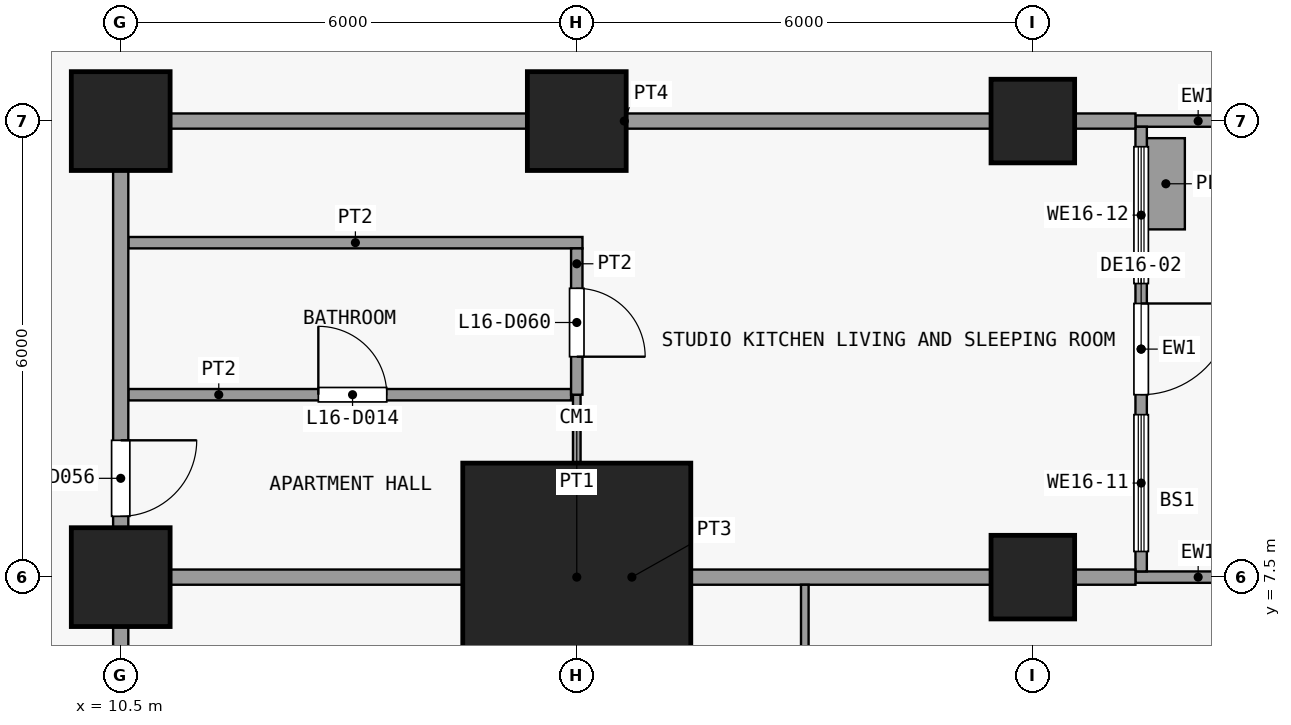
"""IFC4 building model, lengths in metres.
Left out: names, types, materials, properties, quantities, classifications, styles, units other than length and angle.
Written with IfcOpenShell. Run it as: python <this file> out.ifc"""

import sys

from ifc_helpers import new_model, si_unit, direction, frame, frame_2d, origin, origin_2d, place, context, subcontext, project, spatial, rectangle, extrude, element, fill, save


model = new_model("IFC4")
c1 = context("Model", 3, precision=1e-05, world=origin(), true_north=direction((0.0, 1.0)))
c2 = subcontext(c1, "Body", "Model", "MODEL_VIEW")
j1 = project(units=[si_unit("LENGTHUNIT", "METRE"), si_unit("PLANEANGLEUNIT", "RADIAN")], contexts=[c1])
p1 = place(None, origin())
s1 = spatial("IfcSite", under=j1, at=p1, CompositionType="ELEMENT")
p2 = place(p1, origin())
s2 = spatial("IfcBuilding", under=s1, at=p2, CompositionType="ELEMENT")
p3 = place(p2, frame((0.0, 0.0, 68.5)))
s3 = spatial("IfcBuildingStorey", under=s2, at=p3, CompositionType="ELEMENT", Elevation=68.5)
for number, where, z_axis, x_axis in (
    (1, (10.5, 7.5, 0.0), (0.0, 0.0, 1.0), (1.0, 0.0, 0.0)),
    (2, (10.5, 13.5, 0.0), (0.0, 0.0, 1.0), (1.0, 0.0, 0.0)),
):
    element("IfcColumn", number, at=place(p3, frame(where, z_axis=z_axis, x_axis=x_axis)), inside=s3, PredefinedType="COLUMN", context=c2, shape_type="SweptSolid", body=[
        extrude(rectangle(XDim=1.3, YDim=1.3, at=origin_2d()), origin(), (0.0, 0.0, 1.0), 3.6),
    ])
p4 = place(p3, frame((16.5, 7.5, 0.0), z_axis=(0.0, 0.0, 1.0), x_axis=(1.0, 0.0, 0.0)))
e3 = element("IfcColumn", 3, at=p4, inside=s3, PredefinedType="COLUMN", context=c2, shape_type="SweptSolid", body=[
    extrude(rectangle(XDim=3.0, YDim=3.0, at=origin_2d()), origin(), (0.0, 0.0, 1.0), 3.6),
])
p5 = place(p3, frame((16.5, 13.5, 0.0), z_axis=(0.0, 0.0, 1.0), x_axis=(1.0, 0.0, 0.0)))
e4 = element("IfcColumn", 4, at=p5, inside=s3, PredefinedType="COLUMN", context=c2, shape_type="SweptSolid", body=[
    extrude(rectangle(XDim=1.3, YDim=1.3, at=origin_2d()), origin(), (0.0, 0.0, 1.0), 3.6),
])
for number, where, z_axis, x_axis in (
    (5, (22.5, 7.5, 0.0), (0.0, 0.0, 1.0), (1.0, 0.0, 0.0)),
    (6, (22.5, 13.5, 0.0), (0.0, 0.0, 1.0), (1.0, 0.0, 0.0)),
):
    element("IfcColumn", number, at=place(p3, frame(where, z_axis=z_axis, x_axis=x_axis)), inside=s3, PredefinedType="COLUMN", context=c2, shape_type="SweptSolid", body=[
        extrude(rectangle(XDim=1.1, YDim=1.1, at=origin_2d()), origin(), (0.0, 0.0, 1.0), 3.6),
    ])
for number, where, z_axis, x_axis in (
    (7, (23.85, 7.5, 0.0), (0.0, 0.0, 1.0), (1.0, 0.0, 0.0)),
    (8, (23.85, 13.5, 0.0), (0.0, 0.0, 1.0), (1.0, 0.0, 0.0)),
):
    element("IfcWall", number, at=place(p3, frame(where, z_axis=z_axis, x_axis=x_axis)), inside=s3, PredefinedType="SOLIDWALL", context=c2, shape_type="SweptSolid", body=[
        extrude(rectangle(XDim=1.65, YDim=0.15, at=frame_2d((0.825, 0.0))), origin(), (0.0, 0.0, 1.0), 3.3),
    ])
p6 = place(p3, frame((23.925, 13.425, 0.0), z_axis=(0.0, 0.0, 1.0), x_axis=(0.0, -1.0, 0.0)))
e9 = element("IfcWall", 9, at=p6, inside=s3, PredefinedType="SOLIDWALL", context=c2, shape_type="SweptSolid", body=[
    extrude(rectangle(XDim=5.85, YDim=0.15, at=frame_2d((2.925, 0.0))), origin(), (0.0, 0.0, 1.0), 3.3),
])
p7 = place(p6, frame((2.325, 0.0, 0.0)))
e10 = element("IfcOpeningElement", 10, at=p7, cuts=e9, PredefinedType="OPENING", context=c2, shape_type="SweptSolid", body=[
    extrude(rectangle(XDim=1.2, YDim=2.4, at=frame_2d((0.6, 1.2))), frame((0.0, 0.085, 0.0), z_axis=(0.0, -1.0, 0.0), x_axis=(1.0, 0.0, 0.0)), (0.0, 0.0, 1.0), 0.17),
])
p8 = place(p6, frame((3.788, 0.0, 0.9)))
e11 = element("IfcOpeningElement", 11, at=p8, cuts=e9, PredefinedType="OPENING", context=c2, shape_type="SweptSolid", body=[
    extrude(rectangle(XDim=1.8, YDim=2.1, at=frame_2d((0.9, 1.05))), frame((0.0, 0.085, 0.0), z_axis=(0.0, -1.0, 0.0), x_axis=(1.0, 0.0, 0.0)), (0.0, 0.0, 1.0), 0.17),
])
p9 = place(p6, frame((0.262, 0.0, 0.9)))
e12 = element("IfcOpeningElement", 12, at=p9, cuts=e9, PredefinedType="OPENING", context=c2, shape_type="SweptSolid", body=[
    extrude(rectangle(XDim=1.8, YDim=2.1, at=frame_2d((0.9, 1.05))), frame((0.0, 0.085, 0.0), z_axis=(0.0, -1.0, 0.0), x_axis=(1.0, 0.0, 0.0)), (0.0, 0.0, 1.0), 0.17),
])
p10 = place(p3, frame((24.25, 12.075, 0.0), z_axis=(0.0, 0.0, 1.0), x_axis=(0.0, 1.0, 0.0)))
e13 = element("IfcWall", 13, at=p10, inside=s3, PredefinedType="USERDEFINED", context=c2, shape_type="SweptSolid", body=[
    extrude(rectangle(XDim=1.2, YDim=0.5, at=frame_2d((0.6, 0.0))), origin(), (0.0, 0.0, 1.0), 0.9),
])
p11 = place(p3, frame((10.6, 7.5, 0.0), z_axis=(0.0, 0.0, 1.0), x_axis=(1.0, 0.0, 0.0)))
e14 = element("IfcWall", 14, at=p11, inside=s3, PredefinedType="PARTITIONING", context=c2, shape_type="SweptSolid", body=[
    extrude(rectangle(XDim=13.25, YDim=0.2, at=frame_2d((6.625, 0.0))), origin(), (0.0, 0.0, 1.0), 3.3),
])
p12 = place(p3, frame((10.6, 9.9, 0.0), z_axis=(0.0, 0.0, 1.0), x_axis=(1.0, 0.0, 0.0)))
e15 = element("IfcWall", 15, at=p12, inside=s3, PredefinedType="PARTITIONING", context=c2, shape_type="SweptSolid", body=[
    extrude(rectangle(XDim=5.825, YDim=0.15, at=frame_2d((2.913, 0.0))), origin(), (0.0, 0.0, 1.0), 3.3),
])
p13 = place(p12, frame((2.5, 0.0, 0.0)))
e16 = element("IfcOpeningElement", 16, at=p13, cuts=e15, PredefinedType="OPENING", context=c2, shape_type="SweptSolid", body=[
    extrude(rectangle(XDim=0.9, YDim=2.1, at=frame_2d((0.45, 1.05))), frame((0.0, 0.085, 0.0), z_axis=(0.0, -1.0, 0.0), x_axis=(1.0, 0.0, 0.0)), (0.0, 0.0, 1.0), 0.17),
])
p14 = place(p3, frame((10.6, 11.9, 0.0), z_axis=(0.0, 0.0, 1.0), x_axis=(1.0, 0.0, 0.0)))
e17 = element("IfcWall", 17, at=p14, inside=s3, PredefinedType="PARTITIONING", context=c2, shape_type="SweptSolid", body=[
    extrude(rectangle(XDim=5.975, YDim=0.15, at=frame_2d((2.987, 0.0))), origin(), (0.0, 0.0, 1.0), 3.3),
])
p15 = place(p3, frame((10.4, 13.5, 0.0), z_axis=(0.0, 0.0, 1.0), x_axis=(1.0, 0.0, 0.0)))
e18 = element("IfcWall", 18, at=p15, inside=s3, PredefinedType="PARTITIONING", context=c2, shape_type="SweptSolid", body=[
    extrude(rectangle(XDim=13.45, YDim=0.2, at=frame_2d((6.725, 0.0))), origin(), (0.0, 0.0, 1.0), 3.3),
])
p16 = place(p3, frame((10.5, -4.4, 0.0), z_axis=(0.0, 0.0, 1.0), x_axis=(0.0, 1.0, 0.0)))
e19 = element("IfcWall", 19, at=p16, inside=s3, PredefinedType="PARTITIONING", context=c2, shape_type="SweptSolid", body=[
    extrude(rectangle(XDim=17.8, YDim=0.2, at=frame_2d((8.9, 0.0))), origin(), (0.0, 0.0, 1.0), 3.3),
])
p17 = place(p16, frame((3.1, 0.0, 0.0)))
e20 = element("IfcOpeningElement", 20, at=p17, cuts=e19, PredefinedType="OPENING", context=c2, shape_type="SweptSolid", body=[
    extrude(rectangle(XDim=1.0, YDim=2.1, at=frame_2d((0.5, 1.05))), frame((0.0, 0.11, 0.0), z_axis=(0.0, -1.0, 0.0), x_axis=(1.0, 0.0, 0.0)), (0.0, 0.0, 1.0), 0.22),
])
p18 = place(p16, frame((12.7, 0.0, 0.0)))
e21 = element("IfcOpeningElement", 21, at=p18, cuts=e19, PredefinedType="OPENING", context=c2, shape_type="SweptSolid", body=[
    extrude(rectangle(XDim=1.0, YDim=2.1, at=frame_2d((0.5, 1.05))), frame((0.0, 0.11, 0.0), z_axis=(0.0, -1.0, 0.0), x_axis=(1.0, 0.0, 0.0)), (0.0, 0.0, 1.0), 0.22),
])
p19 = place(p3, frame((16.5, 4.4, 0.0), z_axis=(0.0, 0.0, 1.0), x_axis=(0.0, 1.0, 0.0)))
e22 = element("IfcWall", 22, at=p19, inside=s3, PredefinedType="PARTITIONING", context=c2, shape_type="SweptSolid", body=[
    extrude(rectangle(XDim=3.0, YDim=0.1, at=frame_2d((1.5, 0.0))), origin(), (0.0, 0.0, 1.0), 3.3),
])
p20 = place(p3, frame((16.5, 7.6, 0.0), z_axis=(0.0, 0.0, 1.0), x_axis=(0.0, 1.0, 0.0)))
e23 = element("IfcWall", 23, at=p20, inside=s3, PredefinedType="PARTITIONING", context=c2, shape_type="SweptSolid", body=[
    extrude(rectangle(XDim=2.3, YDim=0.1, at=frame_2d((1.15, 0.0))), origin(), (0.0, 0.0, 1.0), 3.3),
])
p21 = place(p3, frame((16.5, 9.9, 0.0), z_axis=(0.0, 0.0, 1.0), x_axis=(0.0, 1.0, 0.0)))
e24 = element("IfcWall", 24, at=p21, inside=s3, PredefinedType="PARTITIONING", context=c2, shape_type="SweptSolid", body=[
    extrude(rectangle(XDim=1.925, YDim=0.15, at=frame_2d((0.962, 0.0))), origin(), (0.0, 0.0, 1.0), 3.3),
])
p22 = place(p21, frame((0.5, 0.0, 0.0)))
e25 = element("IfcOpeningElement", 25, at=p22, cuts=e24, PredefinedType="OPENING", context=c2, shape_type="SweptSolid", body=[
    extrude(rectangle(XDim=0.9, YDim=2.1, at=frame_2d((0.45, 1.05))), frame((0.0, 0.085, 0.0), z_axis=(0.0, -1.0, 0.0), x_axis=(1.0, 0.0, 0.0)), (0.0, 0.0, 1.0), 0.17),
])
p23 = place(p3, frame((19.5, 1.55, 0.0), z_axis=(0.0, 0.0, 1.0), x_axis=(0.0, 1.0, 0.0)))
e26 = element("IfcWall", 26, at=p23, inside=s3, PredefinedType="PARTITIONING", context=c2, shape_type="SweptSolid", body=[
    extrude(rectangle(XDim=5.85, YDim=0.1, at=frame_2d((2.925, 0.0))), origin(), (0.0, 0.0, 1.0), 3.3),
])
p24 = place(p23, frame((2.5, 0.0, 0.0)))
e27 = element("IfcOpeningElement", 27, at=p24, cuts=e26, PredefinedType="OPENING", context=c2, shape_type="SweptSolid", body=[
    extrude(rectangle(XDim=0.9, YDim=2.1, at=frame_2d((0.45, 1.05))), frame((0.0, 0.06, 0.0), z_axis=(0.0, -1.0, 0.0), x_axis=(1.0, 0.0, 0.0)), (0.0, 0.0, 1.0), 0.12),
])
p25 = place(p7, origin())
e28 = element("IfcDoor", 28, at=p25, inside=s3, OperationType="SINGLE_SWING_LEFT", PredefinedType="DOOR", context=c2, shape_type="SweptSolid", body=[
    extrude(rectangle(XDim=1.2, YDim=2.4, at=frame_2d((0.6, 1.2))), frame((0.0, 0.025, 0.0), z_axis=(0.0, -1.0, 0.0), x_axis=(1.0, 0.0, 0.0)), (0.0, 0.0, 1.0), 0.05),
])
fill(e10, e28)
p26 = place(p8, origin())
e29 = element("IfcWindow", 29, at=p26, inside=s3, PartitioningType="SINGLE_PANEL", PredefinedType="WINDOW", context=c2, shape_type="SweptSolid", body=[
    extrude(rectangle(XDim=1.8, YDim=2.1, at=frame_2d((0.9, 1.05))), frame((0.0, 0.03, 0.0), z_axis=(0.0, -1.0, 0.0), x_axis=(1.0, 0.0, 0.0)), (0.0, 0.0, 1.0), 0.06),
])
fill(e11, e29)
p27 = place(p9, origin())
e30 = element("IfcWindow", 30, at=p27, inside=s3, PartitioningType="SINGLE_PANEL", PredefinedType="WINDOW", context=c2, shape_type="SweptSolid", body=[
    extrude(rectangle(XDim=1.8, YDim=2.1, at=frame_2d((0.9, 1.05))), frame((0.0, 0.03, 0.0), z_axis=(0.0, -1.0, 0.0), x_axis=(1.0, 0.0, 0.0)), (0.0, 0.0, 1.0), 0.06),
])
fill(e12, e30)
p28 = place(p13, origin())
e31 = element("IfcDoor", 31, at=p28, inside=s3, OperationType="SINGLE_SWING_RIGHT", PredefinedType="DOOR", context=c2, shape_type="SweptSolid", body=[
    extrude(rectangle(XDim=0.9, YDim=2.1, at=frame_2d((0.45, 1.05))), frame((0.0, 0.025, 0.0), z_axis=(0.0, -1.0, 0.0), x_axis=(1.0, 0.0, 0.0)), (0.0, 0.0, 1.0), 0.05),
])
fill(e16, e31)
p29 = place(p18, origin())
e32 = element("IfcDoor", 32, at=p29, inside=s3, OperationType="SINGLE_SWING_RIGHT", PredefinedType="DOOR", context=c2, shape_type="SweptSolid", body=[
    extrude(rectangle(XDim=1.0, YDim=2.1, at=frame_2d((0.5, 1.05))), frame((0.0, 0.025, 0.0), z_axis=(0.0, -1.0, 0.0), x_axis=(1.0, 0.0, 0.0)), (0.0, 0.0, 1.0), 0.05),
])
fill(e21, e32)
p30 = place(p22, origin())
e33 = element("IfcDoor", 33, at=p30, inside=s3, OperationType="SINGLE_SWING_LEFT", PredefinedType="DOOR", context=c2, shape_type="SweptSolid", body=[
    extrude(rectangle(XDim=0.9, YDim=2.1, at=frame_2d((0.45, 1.05))), frame((0.0, 0.025, 0.0), z_axis=(0.0, -1.0, 0.0), x_axis=(1.0, 0.0, 0.0)), (0.0, 0.0, 1.0), 0.05),
])
fill(e25, e33)
save(model, sys.argv[1])
